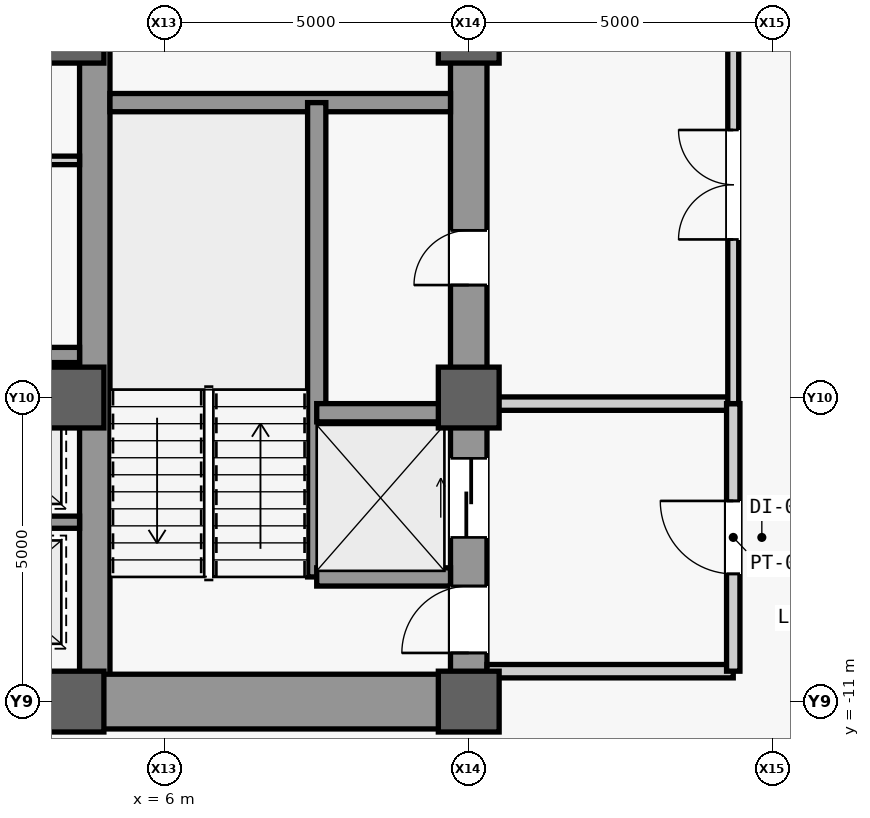
"""IFC4 building model, lengths in metres.
Left out: names, types, materials, properties, quantities, classifications, styles, units other than length and angle.
Written with IfcOpenShell. Run it as: python <this file> out.ifc"""

import sys

from ifc_helpers import new_model, si_unit, direction, frame, frame_2d, origin, origin_2d, place, context, subcontext, project, spatial, rectangle, extrude, source, transform, mapped, element, fill, save


model = new_model("IFC4")
c1 = context("Model", 3, precision=1e-05, world=origin(), true_north=direction((0.0, 1.0)))
c2 = subcontext(c1, "Body", "Model", "MODEL_VIEW")
j1 = project(units=[si_unit("LENGTHUNIT", "METRE"), si_unit("PLANEANGLEUNIT", "RADIAN")], contexts=[c1])
p1 = place(None, origin())
s1 = spatial("IfcSite", under=j1, at=p1, CompositionType="ELEMENT")
p2 = place(p1, origin())
s2 = spatial("IfcBuilding", under=s1, at=p2, CompositionType="ELEMENT")
p3 = place(p2, frame((0.0, 0.0, 45.2)))
s3 = spatial("IfcBuildingStorey", under=s2, at=p3, CompositionType="ELEMENT", Elevation=45.2)
m1 = source(origin(), c2, "Body", "SweptSolid", [
    extrude(rectangle(XDim=22.0, YDim=0.6, at=frame_2d((11.0, 0.0))), origin(), (0.0, 0.0, 1.0), 3.94),
])
p4 = place(p3, frame((11.0, -11.0, 0.0), z_axis=(0.0, 0.0, 1.0), x_axis=(0.0, 1.0, 0.0)))
e1 = element("IfcWall", 1, at=p4, inside=s3, PredefinedType="SHEAR", context=c2, shape_type="MappedRepresentation", body=[
    mapped(m1, transform((0.0, 0.0, 0.0), scale=1.0)),
])
m2 = source(origin(), c2, "Body", "SweptSolid", [
    extrude(rectangle(XDim=1.1, YDim=2.2, at=frame_2d((0.55, 1.1))), frame((0.0, 0.31, 0.0), z_axis=(0.0, -1.0, 0.0), x_axis=(1.0, 0.0, 0.0)), (0.0, 0.0, 1.0), 0.62),
])
p5 = place(p4, frame((0.8, 0.0, 0.0)))
e2 = element("IfcOpeningElement", 2, at=p5, cuts=e1, PredefinedType="OPENING", context=c2, shape_type="MappedRepresentation", body=[
    mapped(m2, transform((0.0, 0.0, 0.0), scale=1.0)),
])
m3 = source(origin(), c2, "Body", "SweptSolid", [
    extrude(rectangle(XDim=0.9, YDim=2.15, at=frame_2d((0.45, 1.075))), frame((0.0, 0.31, 0.0), z_axis=(0.0, -1.0, 0.0), x_axis=(1.0, 0.0, 0.0)), (0.0, 0.0, 1.0), 0.62),
])
p6 = place(p4, frame((6.85, 0.0, 0.0)))
e3 = element("IfcOpeningElement", 3, at=p6, cuts=e1, PredefinedType="OPENING", context=c2, shape_type="MappedRepresentation", body=[
    mapped(m3, transform((0.0, 0.0, 0.0), scale=1.0)),
])
m4 = source(origin(), c2, "Body", "SweptSolid", [
    extrude(rectangle(XDim=1.3, YDim=2.3, at=frame_2d((0.65, 1.15))), frame((0.0, 0.31, 0.0), z_axis=(0.0, -1.0, 0.0), x_axis=(1.0, 0.0, 0.0)), (0.0, 0.0, 1.0), 0.62),
])
p7 = place(p4, frame((2.7, 0.0, 0.0)))
e4 = element("IfcOpeningElement", 4, at=p7, cuts=e1, PredefinedType="OPENING", context=c2, shape_type="MappedRepresentation", body=[
    mapped(m4, transform((0.0, 0.0, 0.0), scale=1.0)),
])
p8 = place(p4, frame((13.35, 0.0, 0.0)))
e5 = element("IfcOpeningElement", 5, at=p8, cuts=e1, PredefinedType="OPENING", context=c2, shape_type="MappedRepresentation", body=[
    mapped(m4, transform((0.0, 0.0, 0.0), scale=1.0)),
])
m5 = source(origin(), c2, "Body", "SweptSolid", [
    extrude(rectangle(XDim=21.4, YDim=0.5, at=frame_2d((10.7, 0.0))), origin(), (0.0, 0.0, 1.0), 3.94),
])
p9 = place(p3, frame((4.85, -10.7, 0.0), z_axis=(0.0, 0.0, 1.0), x_axis=(0.0, 1.0, 0.0)))
e6 = element("IfcWall", 6, at=p9, inside=s3, PredefinedType="SHEAR", context=c2, shape_type="MappedRepresentation", body=[
    mapped(m5, transform((0.0, 0.0, 0.0), scale=1.0)),
])
m6 = source(origin(), c2, "Body", "SweptSolid", [
    extrude(rectangle(XDim=5.85, YDim=0.9, at=frame_2d((2.925, 0.0))), origin(), (0.0, 0.0, 1.0), 3.94),
])
p10 = place(p3, frame((4.85, -11.0, 0.0), z_axis=(0.0, 0.0, 1.0), x_axis=(1.0, 0.0, 0.0)))
e7 = element("IfcWall", 7, at=p10, inside=s3, PredefinedType="SHEAR", context=c2, shape_type="MappedRepresentation", body=[
    mapped(m6, transform((0.0, 0.0, 0.0), scale=1.0)),
])
m7 = source(origin(), c2, "Body", "SweptSolid", [
    extrude(rectangle(XDim=5.6, YDim=0.3, at=frame_2d((2.8, 0.0))), origin(), (0.0, 0.0, 1.0), 3.94),
])
p11 = place(p3, frame((5.1, -1.15, 0.0), z_axis=(0.0, 0.0, 1.0), x_axis=(1.0, 0.0, 0.0)))
e8 = element("IfcWall", 8, at=p11, inside=s3, PredefinedType="SHEAR", context=c2, shape_type="MappedRepresentation", body=[
    mapped(m7, transform((0.0, 0.0, 0.0), scale=1.0)),
])
m8 = source(origin(), c2, "Body", "SweptSolid", [
    extrude(rectangle(XDim=9.2, YDim=0.5, at=frame_2d((4.6, 0.0))), origin(), (0.0, 0.0, 1.0), 3.94),
])
p12 = place(p3, frame((-4.6, -11.0, 0.0), z_axis=(0.0, 0.0, 1.0), x_axis=(1.0, 0.0, 0.0)))
e9 = element("IfcWall", 9, at=p12, inside=s3, PredefinedType="SHEAR", context=c2, shape_type="MappedRepresentation", body=[
    mapped(m8, transform((0.0, 0.0, 0.0), scale=1.0)),
])
m9 = source(origin(), c2, "Body", "SweptSolid", [
    extrude(rectangle(XDim=1.8, YDim=2.25, at=frame_2d((0.9, 1.125))), frame((0.0, 0.26, 0.0), z_axis=(0.0, -1.0, 0.0), x_axis=(1.0, 0.0, 0.0)), (0.0, 0.0, 1.0), 0.52),
])
p13 = place(p12, frame((3.7, 0.0, 0.0)))
e10 = element("IfcOpeningElement", 10, at=p13, cuts=e9, PredefinedType="OPENING", context=c2, shape_type="MappedRepresentation", body=[
    mapped(m9, transform((0.0, 0.0, 0.0), scale=1.0)),
])
m10 = source(origin(), c2, "Body", "SweptSolid", [
    extrude(rectangle(XDim=1.0, YDim=1.0, at=origin_2d()), origin(), (0.0, 0.0, 1.0), 4.2),
])
for number, where, z_axis, x_axis in (
    (11, (4.5, -11.0, 0.0), (0.0, 0.0, 1.0), (1.0, 0.0, 0.0)),
    (12, (4.5, -6.0, 0.0), (0.0, 0.0, 1.0), (1.0, 0.0, 0.0)),
    (13, (4.5, 0.0, 0.0), (0.0, 0.0, 1.0), (1.0, 0.0, 0.0)),
    (14, (11.0, -11.0, 0.0), (0.0, 0.0, 1.0), (1.0, 0.0, 0.0)),
    (15, (11.0, -6.0, 0.0), (0.0, 0.0, 1.0), (1.0, 0.0, 0.0)),
    (16, (11.0, 0.0, 0.0), (0.0, 0.0, 1.0), (1.0, 0.0, 0.0)),
):
    element("IfcColumn", number, at=place(p3, frame(where, z_axis=z_axis, x_axis=x_axis)), inside=s3, PredefinedType="COLUMN", context=c2, shape_type="MappedRepresentation", body=[
        mapped(m10, transform((0.0, 0.0, 0.0), scale=1.0)),
    ])
m11 = source(origin(), c2, "Body", "SweptSolid", [
    extrude(rectangle(XDim=7.8, YDim=0.3, at=frame_2d((3.9, 0.0))), origin(), (0.0, 0.0, 1.0), 3.94),
])
p14 = place(p3, frame((8.5, -8.95, 0.0), z_axis=(0.0, 0.0, 1.0), x_axis=(0.0, 1.0, 0.0)))
e17 = element("IfcWall", 17, at=p14, inside=s3, PredefinedType="SHEAR", context=c2, shape_type="MappedRepresentation", body=[
    mapped(m11, transform((0.0, 0.0, 0.0), scale=1.0)),
])
m12 = source(origin(), c2, "Body", "SweptSolid", [
    extrude(rectangle(XDim=2.2, YDim=0.3, at=frame_2d((1.1, 0.0))), origin(), (0.0, 0.0, 1.0), 3.94),
])
for number, where, z_axis, x_axis in (
    (18, (8.5, -8.95, 0.0), (0.0, 0.0, 1.0), (1.0, 0.0, 0.0)),
    (19, (8.5, -6.25, 0.0), (0.0, 0.0, 1.0), (1.0, 0.0, 0.0)),
):
    element("IfcWall", number, at=place(p3, frame(where, z_axis=z_axis, x_axis=x_axis)), inside=s3, PredefinedType="SHEAR", context=c2, shape_type="MappedRepresentation", body=[
        mapped(m12, transform((0.0, 0.0, 0.0), scale=1.0)),
    ])
m13 = source(origin(), c2, "Body", "SweptSolid", [
    extrude(rectangle(XDim=4.05, YDim=0.22, at=frame_2d((2.025, 0.0))), origin(), (0.0, 0.0, 1.0), 3.94),
])
p15 = place(p3, frame((11.3, -10.5, 0.0), z_axis=(0.0, 0.0, 1.0), x_axis=(1.0, 0.0, 0.0)))
e20 = element("IfcWall", 20, at=p15, inside=s3, PredefinedType="PARTITIONING", context=c2, shape_type="MappedRepresentation", body=[
    mapped(m13, transform((0.0, 0.0, 0.0), scale=1.0)),
])
m14 = source(origin(), c2, "Body", "SweptSolid", [
    extrude(rectangle(XDim=4.05, YDim=0.22, at=frame_2d((2.025, 0.0))), origin(), (0.0, 0.0, 1.0), 3.085),
])
p16 = place(p3, frame((11.3, -6.1, 0.0), z_axis=(0.0, 0.0, 1.0), x_axis=(1.0, 0.0, 0.0)))
e21 = element("IfcWall", 21, at=p16, inside=s3, PredefinedType="PARTITIONING", context=c2, shape_type="MappedRepresentation", body=[
    mapped(m14, transform((0.0, 0.0, 0.0), scale=1.0)),
])
m15 = source(origin(), c2, "Body", "SweptSolid", [
    extrude(rectangle(XDim=4.4, YDim=0.22, at=frame_2d((2.2, 0.0))), origin(), (0.0, 0.0, 1.0), 3.94),
])
p17 = place(p3, frame((15.35, -10.5, 0.0), z_axis=(0.0, 0.0, 1.0), x_axis=(0.0, 1.0, 0.0)))
e22 = element("IfcWall", 22, at=p17, inside=s3, PredefinedType="PARTITIONING", context=c2, shape_type="MappedRepresentation", body=[
    mapped(m15, transform((0.0, 0.0, 0.0), scale=1.0)),
])
m16 = source(origin(), c2, "Body", "SweptSolid", [
    extrude(rectangle(XDim=1.2, YDim=2.2, at=frame_2d((0.6, 1.1))), frame((0.0, 0.12, 0.0), z_axis=(0.0, -1.0, 0.0), x_axis=(1.0, 0.0, 0.0)), (0.0, 0.0, 1.0), 0.24),
])
p18 = place(p17, frame((1.6, 0.0, 0.0)))
e23 = element("IfcOpeningElement", 23, at=p18, cuts=e22, PredefinedType="OPENING", context=c2, shape_type="MappedRepresentation", body=[
    mapped(m16, transform((0.0, 0.0, 0.0), scale=1.0)),
])
m17 = source(origin(), c2, "Body", "SweptSolid", [
    extrude(rectangle(XDim=16.6, YDim=0.18, at=frame_2d((8.3, 0.0))), origin(), (0.0, 0.0, 1.0), 3.94),
])
p19 = place(p3, frame((15.35, -6.1, 0.0), z_axis=(0.0, 0.0, 1.0), x_axis=(0.0, 1.0, 0.0)))
e24 = element("IfcWall", 24, at=p19, inside=s3, PredefinedType="PARTITIONING", context=c2, shape_type="MappedRepresentation", body=[
    mapped(m17, transform((0.0, 0.0, 0.0), scale=1.0)),
])
m18 = source(origin(), c2, "Body", "SweptSolid", [
    extrude(rectangle(XDim=1.8, YDim=2.25, at=frame_2d((0.9, 1.125))), frame((0.0, 0.1, 0.0), z_axis=(0.0, -1.0, 0.0), x_axis=(1.0, 0.0, 0.0)), (0.0, 0.0, 1.0), 0.2),
])
p20 = place(p19, frame((2.7, 0.0, 0.0)))
e25 = element("IfcOpeningElement", 25, at=p20, cuts=e24, PredefinedType="OPENING", context=c2, shape_type="MappedRepresentation", body=[
    mapped(m18, transform((0.0, 0.0, 0.0), scale=1.0)),
])
p21 = place(p19, frame((13.0, 0.0, 0.0)))
e26 = element("IfcOpeningElement", 26, at=p21, cuts=e24, PredefinedType="OPENING", context=c2, shape_type="MappedRepresentation", body=[
    mapped(m18, transform((0.0, 0.0, 0.0), scale=1.0)),
])
m19 = source(origin(), c2, "Body", "SweptSolid", [
    extrude(rectangle(XDim=2.45, YDim=0.2, at=frame_2d((1.225, 0.0))), origin(), (0.0, 0.0, 1.0), 3.94),
])
p22 = place(p3, frame((2.15, -8.05, 0.0), z_axis=(0.0, 0.0, 1.0), x_axis=(1.0, 0.0, 0.0)))
e27 = element("IfcWall", 27, at=p22, inside=s3, PredefinedType="SHEAR", context=c2, shape_type="MappedRepresentation", body=[
    mapped(m19, transform((0.0, 0.0, 0.0), scale=1.0)),
])
m20 = source(origin(), c2, "Body", "SweptSolid", [
    extrude(rectangle(XDim=9.2, YDim=0.25, at=frame_2d((4.6, 0.0))), origin(), (0.0, 0.0, 1.0), 3.94),
])
p23 = place(p3, frame((-4.6, -5.3, 0.0), z_axis=(0.0, 0.0, 1.0), x_axis=(1.0, 0.0, 0.0)))
e28 = element("IfcWall", 28, at=p23, inside=s3, PredefinedType="SHEAR", context=c2, shape_type="MappedRepresentation", body=[
    mapped(m20, transform((0.0, 0.0, 0.0), scale=1.0)),
])
m21 = source(origin(), c2, "Body", "SweptSolid", [
    extrude(rectangle(XDim=1.05, YDim=2.2, at=frame_2d((0.525, 1.1))), frame((0.0, 0.135, 0.0), z_axis=(0.0, -1.0, 0.0), x_axis=(1.0, 0.0, 0.0)), (0.0, 0.0, 1.0), 0.27),
])
p24 = place(p23, frame((4.075, 0.0, 0.0)))
e29 = element("IfcOpeningElement", 29, at=p24, cuts=e28, PredefinedType="OPENING", context=c2, shape_type="MappedRepresentation", body=[
    mapped(m21, transform((0.0, 0.0, 0.0), scale=1.0)),
])
m22 = source(origin(), c2, "Body", "SweptSolid", [
    extrude(rectangle(XDim=3.45, YDim=0.14, at=frame_2d((1.725, 0.0))), origin(), (0.0, 0.0, 1.0), 3.94),
])
p25 = place(p3, frame((1.15, -2.1, 0.0), z_axis=(0.0, 0.0, 1.0), x_axis=(1.0, 0.0, 0.0)))
e30 = element("IfcWall", 30, at=p25, inside=s3, PredefinedType="PARTITIONING", context=c2, shape_type="MappedRepresentation", body=[
    mapped(m22, transform((0.0, 0.0, 0.0), scale=1.0)),
])
m23 = source(origin(), c2, "Body", "SweptSolid", [
    extrude(rectangle(XDim=1.1, YDim=2.2, at=frame_2d((0.55, 1.1))), frame((0.0, 0.025, 0.0), z_axis=(0.0, -1.0, 0.0), x_axis=(1.0, 0.0, 0.0)), (0.0, 0.0, 1.0), 0.05),
])
p26 = place(p5, origin())
e31 = element("IfcDoor", 31, at=p26, inside=s3, OperationType="SINGLE_SWING_LEFT", PredefinedType="DOOR", context=c2, shape_type="MappedRepresentation", body=[
    mapped(m23, transform((0.0, 0.0, 0.0), scale=1.0)),
])
fill(e2, e31)
m24 = source(origin(), c2, "Body", "SweptSolid", [
    extrude(rectangle(XDim=0.9, YDim=2.15, at=frame_2d((0.45, 1.075))), frame((0.0, 0.025, 0.0), z_axis=(0.0, -1.0, 0.0), x_axis=(1.0, 0.0, 0.0)), (0.0, 0.0, 1.0), 0.05),
])
p27 = place(p6, origin())
e32 = element("IfcDoor", 32, at=p27, inside=s3, OperationType="SINGLE_SWING_LEFT", PredefinedType="DOOR", context=c2, shape_type="MappedRepresentation", body=[
    mapped(m24, transform((0.0, 0.0, 0.0), scale=1.0)),
])
fill(e3, e32)
m25 = source(origin(), c2, "Body", "SweptSolid", [
    extrude(rectangle(XDim=1.2, YDim=2.2, at=frame_2d((0.6, 1.1))), frame((0.0, 0.025, 0.0), z_axis=(0.0, -1.0, 0.0), x_axis=(1.0, 0.0, 0.0)), (0.0, 0.0, 1.0), 0.05),
])
p28 = place(p18, origin())
e33 = element("IfcDoor", 33, at=p28, inside=s3, OperationType="SINGLE_SWING_RIGHT", PredefinedType="DOOR", context=c2, shape_type="MappedRepresentation", body=[
    mapped(m25, transform((0.0, 0.0, 0.0), scale=1.0)),
])
fill(e23, e33)
m26 = source(origin(), c2, "Body", "SweptSolid", [
    extrude(rectangle(XDim=1.8, YDim=2.25, at=frame_2d((0.9, 1.125))), frame((0.0, 0.025, 0.0), z_axis=(0.0, -1.0, 0.0), x_axis=(1.0, 0.0, 0.0)), (0.0, 0.0, 1.0), 0.05),
])
p29 = place(p20, origin())
e34 = element("IfcDoor", 34, at=p29, inside=s3, OperationType="SINGLE_SWING_RIGHT", PredefinedType="DOOR", context=c2, shape_type="MappedRepresentation", body=[
    mapped(m26, transform((0.0, 0.0, 0.0), scale=1.0)),
])
fill(e25, e34)
m27 = source(origin(), c2, "Body", "SweptSolid", [
    extrude(rectangle(XDim=1.3, YDim=2.3, at=frame_2d((0.65, 1.15))), frame((0.0, 0.025, 0.0), z_axis=(0.0, -1.0, 0.0), x_axis=(1.0, 0.0, 0.0)), (0.0, 0.0, 1.0), 0.05),
])
p30 = place(p7, origin())
e35 = element("IfcDoor", 35, at=p30, inside=s3, OperationType="SLIDING_TO_LEFT", PredefinedType="DOOR", context=c2, shape_type="MappedRepresentation", body=[
    mapped(m27, transform((0.0, 0.0, 0.0), scale=1.0)),
])
fill(e4, e35)
save(model, sys.argv[1])
